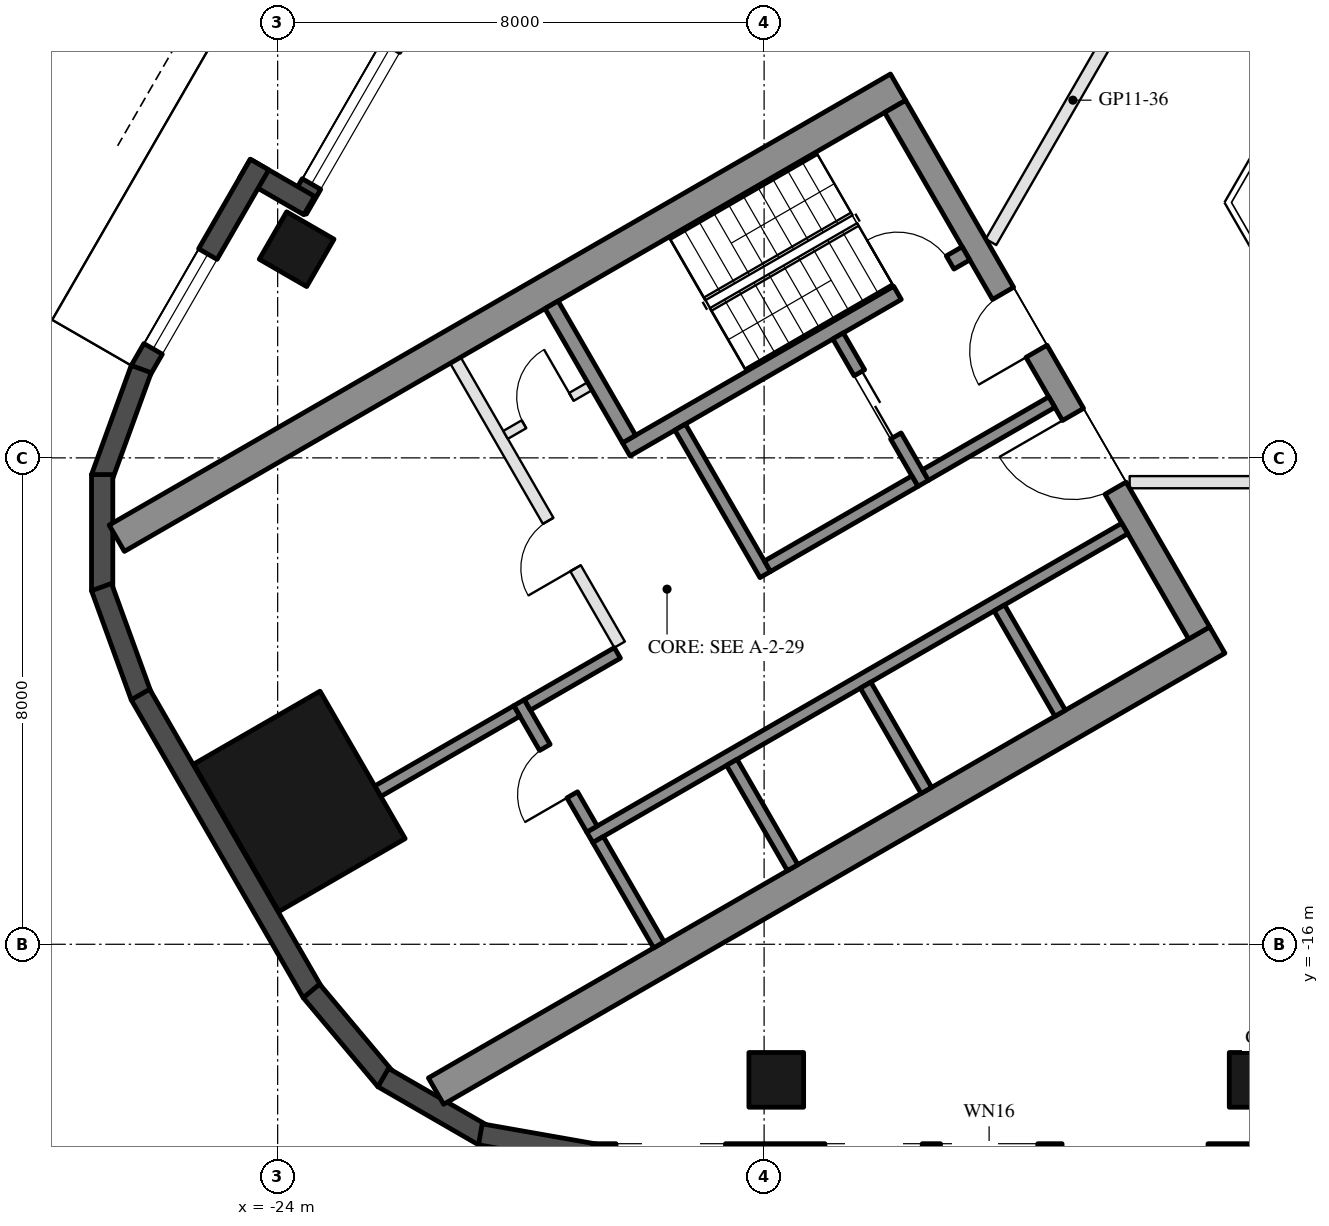
"""IFC4 building model, lengths in metres.
Left out: names, types, materials, properties, quantities, classifications, styles, units other than length and angle.
Written with IfcOpenShell. Run it as: python <this file> out.ifc"""

import sys

from ifc_helpers import new_model, si_unit, direction, frame, frame_2d, origin, origin_2d, place, context, subcontext, project, spatial, rectangle, hollow_rectangle, extrude, element, fill, save


model = new_model("IFC4")
c1 = context("Model", 3, precision=1e-05, world=origin(), true_north=direction((0.0, 1.0)))
c2 = subcontext(c1, "Body", "Model", "MODEL_VIEW")
j1 = project(units=[si_unit("LENGTHUNIT", "METRE"), si_unit("PLANEANGLEUNIT", "RADIAN")], contexts=[c1])
p1 = place(None, origin())
s1 = spatial("IfcSite", under=j1, at=p1, CompositionType="ELEMENT")
p2 = place(p1, origin())
s2 = spatial("IfcBuilding", under=s1, at=p2, CompositionType="ELEMENT")
p3 = place(p2, frame((0.0, 0.0, 127.9)))
s3 = spatial("IfcBuildingStorey", under=s2, at=p3, CompositionType="ELEMENT", Elevation=127.9)
for number, where, z_axis, x_axis in (
    (1, (-15.8, -18.23, 0.0), (0.0, 0.0, 1.0), (-1.0, 0.0, 0.0)),
    (2, (-7.9, -18.23, 0.0), (0.0, 0.0, 1.0), (-1.0, 0.0, 0.0)),
    (3, (-23.688, -4.568, 0.0), (0.0, 0.0, 1.0), (0.5, 0.866, 0.0)),
):
    element("IfcColumn", number, at=place(p3, frame(where, z_axis=z_axis, x_axis=x_axis)), inside=s3, PredefinedType="COLUMN", context=c2, shape_type="SweptSolid", body=[
        extrude(hollow_rectangle(XDim=0.9, YDim=0.9, WallThickness=0.04, at=origin_2d()), origin(), (0.0, 0.0, 1.0), 3.7),
    ])
p4 = place(p3, frame((-23.643, -13.65, 0.0), z_axis=(0.0, 0.0, 1.0), x_axis=(-0.5, 0.866025403784, 0.0)))
e4 = element("IfcColumn", 4, at=p4, inside=s3, PredefinedType="COLUMN", context=c2, shape_type="SweptSolid", body=[
    extrude(hollow_rectangle(XDim=2.8, YDim=2.4, WallThickness=0.07, at=origin_2d()), origin(), (0.0, 0.0, 1.0), 3.7),
])
p5 = place(p3, frame((-20.309, 1.934, 0.0), z_axis=(0.0, 0.0, 1.0), x_axis=(-0.499992114976, -0.866029956157, 0.0)))
e5 = element("IfcWall", 5, at=p5, inside=s3, PredefinedType="SOLIDWALL", context=c2, shape_type="SweptSolid", body=[
    extrude(rectangle(XDim=6.74, YDim=0.35, at=frame_2d((3.37, 0.0))), origin(), (0.0, 0.0, 1.0), 3.45),
])
p6 = place(p5, frame((0.77, 0.0, 0.3)))
e6 = element("IfcOpeningElement", 6, at=p6, cuts=e5, PredefinedType="OPENING", context=c2, shape_type="SweptSolid", body=[
    extrude(rectangle(XDim=2.6, YDim=2.65, at=frame_2d((1.3, 1.325))), frame((0.0, 0.185, 0.0), z_axis=(0.0, -1.0, 0.0), x_axis=(1.0, 0.0, 0.0)), (0.0, 0.0, 1.0), 0.37),
])
p7 = place(p5, frame((3.67, 0.0, 0.3)))
e7 = element("IfcOpeningElement", 7, at=p7, cuts=e5, PredefinedType="OPENING", context=c2, shape_type="SweptSolid", body=[
    extrude(rectangle(XDim=2.6, YDim=2.65, at=frame_2d((1.3, 1.325))), frame((0.0, 0.185, 0.0), z_axis=(0.0, -1.0, 0.0), x_axis=(1.0, 0.0, 0.0)), (0.0, 0.0, 1.0), 0.37),
])
p8 = place(p3, frame((-23.481, -3.85, 0.0), z_axis=(0.0, 0.0, 1.0), x_axis=(-0.866092288191, 0.499884134912, 0.0)))
e8 = element("IfcWall", 8, at=p8, inside=s3, PredefinedType="SOLIDWALL", context=c2, shape_type="SweptSolid", body=[
    extrude(rectangle(XDim=1.22, YDim=0.35, at=frame_2d((0.61, 0.0))), origin(), (0.0, 0.0, 1.0), 3.45),
])
p9 = place(p3, frame((-24.299, -3.176, 0.0), z_axis=(0.0, 0.0, 1.0), x_axis=(-0.500028278809, -0.866009076391, 0.0)))
e9 = element("IfcWall", 9, at=p9, inside=s3, PredefinedType="SOLIDWALL", context=c2, shape_type="SweptSolid", body=[
    extrude(rectangle(XDim=3.916, YDim=0.35, at=frame_2d((1.958, 0.0))), origin(), (0.0, 0.0, 1.0), 3.45),
])
p10 = place(p9, frame((1.7, 0.0, 0.3)))
e10 = element("IfcOpeningElement", 10, at=p10, cuts=e9, PredefinedType="OPENING", context=c2, shape_type="SweptSolid", body=[
    extrude(rectangle(XDim=1.8, YDim=2.65, at=frame_2d((0.9, 1.325))), frame((0.0, 0.185, 0.0), z_axis=(0.0, -1.0, 0.0), x_axis=(1.0, 0.0, 0.0)), (0.0, 0.0, 1.0), 0.37),
])
for number, where, z_axis, x_axis in (
    (11, (-26.244, -6.54, 0.0), (0.0, 0.0, 1.0), (-0.342, -0.94, 0.0)),
    (12, (-26.886, -8.275, 0.0), (0.0, 0.0, 1.0), (0.0, -1.0, 0.0)),
    (13, (-26.897, -10.125, 0.0), (0.0, 0.0, 1.0), (0.342, -0.94, 0.0)),
):
    element("IfcWall", number, at=place(p3, frame(where, z_axis=z_axis, x_axis=x_axis)), inside=s3, PredefinedType="SOLIDWALL", context=c2, shape_type="SweptSolid", body=[
        extrude(rectangle(XDim=1.91, YDim=0.35, at=frame_2d((0.955, 0.0))), origin(), (0.0, 0.0, 1.0), 3.45),
    ])
p11 = place(p3, frame((-26.257, -11.893, 0.0), z_axis=(0.0, 0.0, 1.0), x_axis=(0.500018773155, -0.866014564827, 0.0)))
e14 = element("IfcWall", 14, at=p11, inside=s3, PredefinedType="SOLIDWALL", context=c2, shape_type="SweptSolid", body=[
    extrude(rectangle(XDim=5.658, YDim=0.35, at=frame_2d((2.829, 0.0))), origin(), (0.0, 0.0, 1.0), 3.45),
])
for number, where, z_axis, x_axis in (
    (15, (-23.445, -16.768, 0.0), (0.0, 0.0, 1.0), (0.643, -0.766, 0.0)),
    (16, (-22.264, -18.192, 0.0), (0.0, 0.0, 1.0), (0.866, -0.5, 0.0)),
):
    element("IfcWall", number, at=place(p3, frame(where, z_axis=z_axis, x_axis=x_axis)), inside=s3, PredefinedType="SOLIDWALL", context=c2, shape_type="SweptSolid", body=[
        extrude(rectangle(XDim=1.91, YDim=0.35, at=frame_2d((0.955, 0.0))), origin(), (0.0, 0.0, 1.0), 3.45),
    ])
p12 = place(p3, frame((-20.667, -19.126, 0.0), z_axis=(0.0, 0.0, 1.0), x_axis=(0.984798995425, -0.173697837091, 0.0)))
e17 = element("IfcWall", 17, at=p12, inside=s3, PredefinedType="SOLIDWALL", context=c2, shape_type="SweptSolid", body=[
    extrude(rectangle(XDim=1.91, YDim=0.35, at=frame_2d((0.955, 0.0))), origin(), (0.0, 0.0, 1.0), 3.45),
])
p13 = place(p3, frame((-18.816, -19.455, 0.0), z_axis=(0.0, 0.0, 1.0), x_axis=(1.0, 0.0, 0.0)))
e18 = element("IfcWall", 18, at=p13, inside=s3, PredefinedType="SOLIDWALL", context=c2, shape_type="SweptSolid", body=[
    extrude(rectangle(XDim=11.816, YDim=0.35, at=frame_2d((5.908, 0.0))), origin(), (0.0, 0.0, 1.0), 3.45),
])
p14 = place(p13, frame((0.381, 0.0, 0.3)))
e19 = element("IfcOpeningElement", 19, at=p14, cuts=e18, PredefinedType="OPENING", context=c2, shape_type="SweptSolid", body=[
    extrude(rectangle(XDim=1.8, YDim=2.65, at=frame_2d((0.9, 1.325))), frame((0.0, 0.185, 0.0), z_axis=(0.0, -1.0, 0.0), x_axis=(1.0, 0.0, 0.0)), (0.0, 0.0, 1.0), 0.37),
])
p15 = place(p13, frame((7.716, 0.0, 0.0)))
e20 = element("IfcOpeningElement", 20, at=p15, cuts=e18, PredefinedType="OPENING", context=c2, shape_type="SweptSolid", body=[
    extrude(rectangle(XDim=2.4, YDim=2.4, at=frame_2d((1.2, 1.2))), frame((0.0, 0.185, 0.0), z_axis=(0.0, -1.0, 0.0), x_axis=(1.0, 0.0, 0.0)), (0.0, 0.0, 1.0), 0.37),
])
p16 = place(p13, frame((3.816, 0.0, 0.3)))
e21 = element("IfcOpeningElement", 21, at=p16, cuts=e18, PredefinedType="OPENING", context=c2, shape_type="SweptSolid", body=[
    extrude(rectangle(XDim=1.6, YDim=2.65, at=frame_2d((0.8, 1.325))), frame((0.0, 0.185, 0.0), z_axis=(0.0, -1.0, 0.0), x_axis=(1.0, 0.0, 0.0)), (0.0, 0.0, 1.0), 0.37),
])
p17 = place(p13, frame((5.716, 0.0, 0.3)))
e22 = element("IfcOpeningElement", 22, at=p17, cuts=e18, PredefinedType="OPENING", context=c2, shape_type="SweptSolid", body=[
    extrude(rectangle(XDim=1.6, YDim=2.65, at=frame_2d((0.8, 1.325))), frame((0.0, 0.185, 0.0), z_axis=(0.0, -1.0, 0.0), x_axis=(1.0, 0.0, 0.0)), (0.0, 0.0, 1.0), 0.37),
])
for number, where, z_axis, x_axis in (
    (23, (-13.797, -1.903, 0.0), (0.0, 0.0, 1.0), (-0.866, -0.5, 0.0)),
    (24, (-8.547, -10.997, 0.0), (0.0, 0.0, 1.0), (-0.866, -0.5, 0.0)),
):
    element("IfcWall", number, at=place(p3, frame(where, z_axis=z_axis, x_axis=x_axis)), inside=s3, PredefinedType="SHEAR", context=c2, shape_type="SweptSolid", body=[
        extrude(rectangle(XDim=14.837, YDim=0.5, at=frame_2d((7.418, 0.0))), origin(), (0.0, 0.0, 1.0), 3.45),
    ])
p18 = place(p3, frame((-13.845, -2.22, 0.0), z_axis=(0.0, 0.0, 1.0), x_axis=(0.500004234368, -0.866022959057, 0.0)))
e25 = element("IfcWall", 25, at=p18, inside=s3, PredefinedType="SHEAR", context=c2, shape_type="SweptSolid", body=[
    extrude(rectangle(XDim=10.0, YDim=0.4, at=frame_2d((5.0, 0.0))), origin(), (0.0, 0.0, 1.0), 3.45),
])
p19 = place(p18, frame((3.55, 0.0, 0.0)))
e26 = element("IfcOpeningElement", 26, at=p19, cuts=e25, PredefinedType="OPENING", context=c2, shape_type="SweptSolid", body=[
    extrude(rectangle(XDim=1.1, YDim=2.1, at=frame_2d((0.55, 1.05))), frame((0.0, 0.21, 0.0), z_axis=(0.0, -1.0, 0.0), x_axis=(1.0, 0.0, 0.0)), (0.0, 0.0, 1.0), 0.42),
])
p20 = place(p18, frame((5.85, 0.0, 0.0)))
e27 = element("IfcOpeningElement", 27, at=p20, cuts=e25, PredefinedType="OPENING", context=c2, shape_type="SweptSolid", body=[
    extrude(rectangle(XDim=1.4, YDim=2.1, at=frame_2d((0.7, 1.05))), frame((0.0, 0.21, 0.0), z_axis=(0.0, -1.0, 0.0), x_axis=(1.0, 0.0, 0.0)), (0.0, 0.0, 1.0), 0.42),
])
p21 = place(p3, frame((-12.681, -4.636, 0.0), z_axis=(0.0, 0.0, 1.0), x_axis=(-0.866021702275, -0.500006411147, 0.0)))
e28 = element("IfcWall", 28, at=p21, inside=s3, PredefinedType="SHEAR", context=c2, shape_type="SweptSolid", body=[
    extrude(rectangle(XDim=6.45, YDim=0.25, at=frame_2d((3.225, 0.0))), origin(), (0.0, 0.0, 1.0), 3.45),
])
p22 = place(p21, frame((0.3, 0.0, 0.0)))
e29 = element("IfcOpeningElement", 29, at=p22, cuts=e28, PredefinedType="OPENING", context=c2, shape_type="SweptSolid", body=[
    extrude(rectangle(XDim=1.0, YDim=2.1, at=frame_2d((0.5, 1.05))), frame((0.0, 0.135, 0.0), z_axis=(0.0, -1.0, 0.0), x_axis=(1.0, 0.0, 0.0)), (0.0, 0.0, 1.0), 0.27),
])
p23 = place(p3, frame((-19.496, -5.482, 0.0), z_axis=(0.0, 0.0, 1.0), x_axis=(0.499990435942, -0.866030925526, 0.0)))
e30 = element("IfcWall", 30, at=p23, inside=s3, PredefinedType="SHEAR", context=c2, shape_type="SweptSolid", body=[
    extrude(rectangle(XDim=2.55, YDim=0.25, at=frame_2d((1.275, 0.0))), origin(), (0.0, 0.0, 1.0), 3.45),
])
p24 = place(p3, frame((-17.381, -7.495, 0.0), z_axis=(0.0, 0.0, 1.0), x_axis=(0.500011755427, -0.866018616679, 0.0)))
e31 = element("IfcWall", 31, at=p24, inside=s3, PredefinedType="SHEAR", context=c2, shape_type="SweptSolid", body=[
    extrude(rectangle(XDim=2.8, YDim=0.2, at=frame_2d((1.4, 0.0))), origin(), (0.0, 0.0, 1.0), 3.45),
])
p25 = place(p3, frame((-14.783, -5.995, 0.0), z_axis=(0.0, 0.0, 1.0), x_axis=(0.49994636267, -0.866056369097, 0.0)))
e32 = element("IfcWall", 32, at=p25, inside=s3, PredefinedType="SHEAR", context=c2, shape_type="SweptSolid", body=[
    extrude(rectangle(XDim=2.8, YDim=0.2, at=frame_2d((1.4, 0.0))), origin(), (0.0, 0.0, 1.0), 3.45),
])
p26 = place(p25, frame((0.7, 0.0, 0.0)))
e33 = element("IfcOpeningElement", 33, at=p26, cuts=e32, PredefinedType="OPENING", context=c2, shape_type="SweptSolid", body=[
    extrude(rectangle(XDim=1.2, YDim=2.1, at=frame_2d((0.6, 1.05))), frame((0.0, 0.11, 0.0), z_axis=(0.0, -1.0, 0.0), x_axis=(1.0, 0.0, 0.0)), (0.0, 0.0, 1.0), 0.22),
])
p27 = place(p3, frame((-13.52, -8.383, 0.0), z_axis=(0.0, 0.0, 1.0), x_axis=(-0.866034573852, -0.49998411664, 0.0)))
e34 = element("IfcWall", 34, at=p27, inside=s3, PredefinedType="SHEAR", context=c2, shape_type="SweptSolid", body=[
    extrude(rectangle(XDim=2.8, YDim=0.2, at=frame_2d((1.4, 0.0))), origin(), (0.0, 0.0, 1.0), 3.45),
])
p28 = place(p3, frame((-11.268, -7.083, 0.0), z_axis=(0.0, 0.0, 1.0), x_axis=(-0.866050077142, -0.499957262057, 0.0)))
e35 = element("IfcWall", 35, at=p28, inside=s3, PredefinedType="SHEAR", context=c2, shape_type="SweptSolid", body=[
    extrude(rectangle(XDim=2.4, YDim=0.2, at=frame_2d((1.2, 0.0))), origin(), (0.0, 0.0, 1.0), 3.45),
])
p29 = place(p3, frame((-10.068, -9.162, 0.0), z_axis=(0.0, 0.0, 1.0), x_axis=(-0.866032725843, -0.499987317609, 0.0)))
e36 = element("IfcWall", 36, at=p29, inside=s3, PredefinedType="SHEAR", context=c2, shape_type="SweptSolid", body=[
    extrude(rectangle(XDim=10.16, YDim=0.2, at=frame_2d((5.08, 0.0))), origin(), (0.0, 0.0, 1.0), 3.45),
])
p30 = place(p3, frame((-20.031, -12.026, 0.0), z_axis=(0.0, 0.0, 1.0), x_axis=(0.500033551112, -0.866006032174, 0.0)))
e37 = element("IfcWall", 37, at=p30, inside=s3, PredefinedType="SHEAR", context=c2, shape_type="SweptSolid", body=[
    extrude(rectangle(XDim=2.4, YDim=0.2, at=frame_2d((1.2, 0.0))), origin(), (0.0, 0.0, 1.0), 3.45),
])
p31 = place(p30, frame((0.85, 0.0, 0.0)))
e38 = element("IfcOpeningElement", 38, at=p31, cuts=e37, PredefinedType="OPENING", context=c2, shape_type="SweptSolid", body=[
    extrude(rectangle(XDim=0.9, YDim=2.1, at=frame_2d((0.45, 1.05))), frame((0.0, 0.11, 0.0), z_axis=(0.0, -1.0, 0.0), x_axis=(1.0, 0.0, 0.0)), (0.0, 0.0, 1.0), 0.22),
])
p32 = place(p3, frame((-18.413, -11.208, 0.0), z_axis=(0.0, 0.0, 1.0), x_axis=(-0.866038183914, -0.499977863513, 0.0)))
e39 = element("IfcWall", 39, at=p32, inside=s3, PredefinedType="SHEAR", context=c2, shape_type="SweptSolid", body=[
    extrude(rectangle(XDim=1.71, YDim=0.2, at=frame_2d((0.855, 0.0))), origin(), (0.0, 0.0, 1.0), 3.45),
])
for number, where, z_axis, x_axis in (
    (40, (-12.131, -10.468, 0.0), (0.0, 0.0, 1.0), (0.5, -0.866, 0.0)),
    (41, (-14.331, -11.738, 0.0), (0.0, 0.0, 1.0), (0.5, -0.866, 0.0)),
    (42, (-16.531, -13.008, 0.0), (0.0, 0.0, 1.0), (0.5, -0.866, 0.0)),
    (43, (-18.73, -14.278, 0.0), (0.0, 0.0, 1.0), (0.5, -0.866, 0.0)),
):
    element("IfcWall", number, at=place(p3, frame(where, z_axis=z_axis, x_axis=x_axis)), inside=s3, PredefinedType="SHEAR", context=c2, shape_type="SweptSolid", body=[
        extrude(rectangle(XDim=2.0, YDim=0.2, at=frame_2d((1.0, 0.0))), origin(), (0.0, 0.0, 1.0), 3.45),
    ])
p33 = place(p3, frame((-20.067, -12.163, 0.0), z_axis=(0.0, 0.0, 1.0), x_axis=(-0.866060851709, -0.499938597367, 0.0)))
e44 = element("IfcWall", 44, at=p33, inside=s3, PredefinedType="SHEAR", context=c2, shape_type="SweptSolid", body=[
    extrude(rectangle(XDim=2.64, YDim=0.2, at=frame_2d((1.32, 0.0))), origin(), (0.0, 0.0, 1.0), 3.45),
])
p34 = place(p3, frame((-21.076, -6.395, 0.0), z_axis=(0.0, 0.0, 1.0), x_axis=(0.50001468107, -0.866016927499, 0.0)))
e45 = element("IfcWall", 45, at=p34, inside=s3, PredefinedType="PARTITIONING", context=c2, shape_type="SweptSolid", body=[
    extrude(rectangle(XDim=5.4, YDim=0.2, at=frame_2d((2.7, 0.0))), origin(), (0.0, 0.0, 1.0), 3.45),
])
p35 = place(p34, frame((3.05, 0.0, 0.0)))
e46 = element("IfcOpeningElement", 46, at=p35, cuts=e45, PredefinedType="OPENING", context=c2, shape_type="SweptSolid", body=[
    extrude(rectangle(XDim=0.9, YDim=2.1, at=frame_2d((0.45, 1.05))), frame((0.0, 0.11, 0.0), z_axis=(0.0, -1.0, 0.0), x_axis=(1.0, 0.0, 0.0)), (0.0, 0.0, 1.0), 0.22),
])
p36 = place(p3, frame((-18.866, -6.822, 0.0), z_axis=(0.0, 0.0, 1.0), x_axis=(-0.866028054938, -0.499995408039, 0.0)))
e47 = element("IfcWall", 47, at=p36, inside=s3, PredefinedType="PARTITIONING", context=c2, shape_type="SweptSolid", body=[
    extrude(rectangle(XDim=1.6, YDim=0.15, at=frame_2d((0.8, 0.0))), origin(), (0.0, 0.0, 1.0), 3.45),
])
p37 = place(p36, frame((0.35, 0.0, 0.0)))
e48 = element("IfcOpeningElement", 48, at=p37, cuts=e47, PredefinedType="OPENING", context=c2, shape_type="SweptSolid", body=[
    extrude(rectangle(XDim=0.9, YDim=2.1, at=frame_2d((0.45, 1.05))), frame((0.0, 0.085, 0.0), z_axis=(0.0, -1.0, 0.0), x_axis=(1.0, 0.0, 0.0)), (0.0, 0.0, 1.0), 0.17),
])
p38 = place(p3, frame((0.909, -8.4, 0.0), z_axis=(0.0, 0.0, 1.0), x_axis=(-1.0, 0.0, 0.0)))
e49 = element("IfcWall", 49, at=p38, inside=s3, PredefinedType="PARTITIONING", context=c2, shape_type="SweptSolid", body=[
    extrude(rectangle(XDim=10.897, YDim=0.2, at=frame_2d((5.448, 0.0))), origin(), (0.0, 0.0, 1.0), 2.76),
])
p39 = place(p38, frame((4.948, 0.0, 0.0)))
e50 = element("IfcOpeningElement", 50, at=p39, cuts=e49, PredefinedType="OPENING", context=c2, shape_type="SweptSolid", body=[
    extrude(rectangle(XDim=1.0, YDim=2.1, at=frame_2d((0.5, 1.05))), frame((0.0, 0.11, 0.0), z_axis=(0.0, -1.0, 0.0), x_axis=(1.0, 0.0, 0.0)), (0.0, 0.0, 1.0), 0.22),
])
p40 = place(p3, frame((-12.269, -4.45, 0.0), z_axis=(0.0, 0.0, 1.0), x_axis=(0.500004878216, 0.866022587327, 0.0)))
e51 = element("IfcWall", 51, at=p40, inside=s3, PredefinedType="PARTITIONING", context=c2, shape_type="SweptSolid", body=[
    extrude(rectangle(XDim=8.979, YDim=0.2, at=frame_2d((4.49, 0.0))), origin(), (0.0, 0.0, 1.0), 2.76),
])
p41 = place(p40, frame((3.99, 0.0, 0.0)))
e52 = element("IfcOpeningElement", 52, at=p41, cuts=e51, PredefinedType="OPENING", context=c2, shape_type="SweptSolid", body=[
    extrude(rectangle(XDim=1.0, YDim=2.1, at=frame_2d((0.5, 1.05))), frame((0.0, 0.11, 0.0), z_axis=(0.0, -1.0, 0.0), x_axis=(1.0, 0.0, 0.0)), (0.0, 0.0, 1.0), 0.22),
])
p42 = place(p7, origin())
e53 = element("IfcWindow", 53, at=p42, inside=s3, PartitioningType="SINGLE_PANEL", PredefinedType="WINDOW", context=c2, shape_type="SweptSolid", body=[
    extrude(rectangle(XDim=2.6, YDim=2.65, at=frame_2d((1.3, 1.325))), frame((0.0, 0.03, 0.0), z_axis=(0.0, -1.0, 0.0), x_axis=(1.0, 0.0, 0.0)), (0.0, 0.0, 1.0), 0.06),
])
fill(e7, e53)
p43 = place(p10, origin())
e54 = element("IfcWindow", 54, at=p43, inside=s3, PartitioningType="SINGLE_PANEL", PredefinedType="WINDOW", context=c2, shape_type="SweptSolid", body=[
    extrude(rectangle(XDim=1.8, YDim=2.65, at=frame_2d((0.9, 1.325))), frame((0.0, 0.03, 0.0), z_axis=(0.0, -1.0, 0.0), x_axis=(1.0, 0.0, 0.0)), (0.0, 0.0, 1.0), 0.06),
])
fill(e10, e54)
p44 = place(p26, origin())
e55 = element("IfcDoor", 55, at=p44, inside=s3, OperationType="DOUBLE_DOOR_SLIDING", PredefinedType="DOOR", context=c2, shape_type="SweptSolid", body=[
    extrude(rectangle(XDim=1.2, YDim=2.1, at=frame_2d((0.6, 1.05))), frame((0.0, 0.025, 0.0), z_axis=(0.0, -1.0, 0.0), x_axis=(1.0, 0.0, 0.0)), (0.0, 0.0, 1.0), 0.05),
])
fill(e33, e55)
p45 = place(p37, frame((0.9, 0.0, 0.0), z_axis=(0.0, 0.0, 1.0), x_axis=(-1.0, 0.0, 0.0)))
e56 = element("IfcDoor", 56, at=p45, inside=s3, OperationType="SINGLE_SWING_RIGHT", PredefinedType="DOOR", context=c2, shape_type="SweptSolid", body=[
    extrude(rectangle(XDim=0.9, YDim=2.1, at=frame_2d((0.45, 1.05))), frame((0.0, 0.025, 0.0), z_axis=(0.0, -1.0, 0.0), x_axis=(1.0, 0.0, 0.0)), (0.0, 0.0, 1.0), 0.05),
])
fill(e48, e56)
p46 = place(p31, frame((0.9, 0.0, 0.0), z_axis=(0.0, 0.0, 1.0), x_axis=(-1.0, 0.0, 0.0)))
e57 = element("IfcDoor", 57, at=p46, inside=s3, OperationType="SINGLE_SWING_LEFT", PredefinedType="DOOR", context=c2, shape_type="SweptSolid", body=[
    extrude(rectangle(XDim=0.9, YDim=2.1, at=frame_2d((0.45, 1.05))), frame((0.0, 0.025, 0.0), z_axis=(0.0, -1.0, 0.0), x_axis=(1.0, 0.0, 0.0)), (0.0, 0.0, 1.0), 0.05),
])
fill(e38, e57)
p47 = place(p35, frame((0.9, 0.0, 0.0), z_axis=(0.0, 0.0, 1.0), x_axis=(-1.0, 0.0, 0.0)))
e58 = element("IfcDoor", 58, at=p47, inside=s3, OperationType="SINGLE_SWING_LEFT", PredefinedType="DOOR", context=c2, shape_type="SweptSolid", body=[
    extrude(rectangle(XDim=0.9, YDim=2.1, at=frame_2d((0.45, 1.05))), frame((0.0, 0.025, 0.0), z_axis=(0.0, -1.0, 0.0), x_axis=(1.0, 0.0, 0.0)), (0.0, 0.0, 1.0), 0.05),
])
fill(e46, e58)
p48 = place(p19, frame((1.1, 0.0, 0.0), z_axis=(0.0, 0.0, 1.0), x_axis=(-1.0, 0.0, 0.0)))
e59 = element("IfcDoor", 59, at=p48, inside=s3, OperationType="SINGLE_SWING_LEFT", PredefinedType="DOOR", context=c2, shape_type="SweptSolid", body=[
    extrude(rectangle(XDim=1.1, YDim=2.1, at=frame_2d((0.55, 1.05))), frame((0.0, 0.025, 0.0), z_axis=(0.0, -1.0, 0.0), x_axis=(1.0, 0.0, 0.0)), (0.0, 0.0, 1.0), 0.05),
])
fill(e26, e59)
p49 = place(p20, frame((1.4, 0.0, 0.0), z_axis=(0.0, 0.0, 1.0), x_axis=(-1.0, 0.0, 0.0)))
e60 = element("IfcDoor", 60, at=p49, inside=s3, OperationType="DOUBLE_DOOR_SINGLE_SWING", PredefinedType="DOOR", context=c2, shape_type="SweptSolid", body=[
    extrude(rectangle(XDim=1.4, YDim=2.1, at=frame_2d((0.7, 1.05))), frame((0.0, 0.025, 0.0), z_axis=(0.0, -1.0, 0.0), x_axis=(1.0, 0.0, 0.0)), (0.0, 0.0, 1.0), 0.05),
])
fill(e27, e60)
p50 = place(p22, frame((1.0, 0.0, 0.0), z_axis=(0.0, 0.0, 1.0), x_axis=(-1.0, 0.0, 0.0)))
e61 = element("IfcDoor", 61, at=p50, inside=s3, OperationType="SINGLE_SWING_LEFT", PredefinedType="DOOR", context=c2, shape_type="SweptSolid", body=[
    extrude(rectangle(XDim=1.0, YDim=2.1, at=frame_2d((0.5, 1.05))), frame((0.0, 0.025, 0.0), z_axis=(0.0, -1.0, 0.0), x_axis=(1.0, 0.0, 0.0)), (0.0, 0.0, 1.0), 0.05),
])
fill(e29, e61)
save(model, sys.argv[1])
